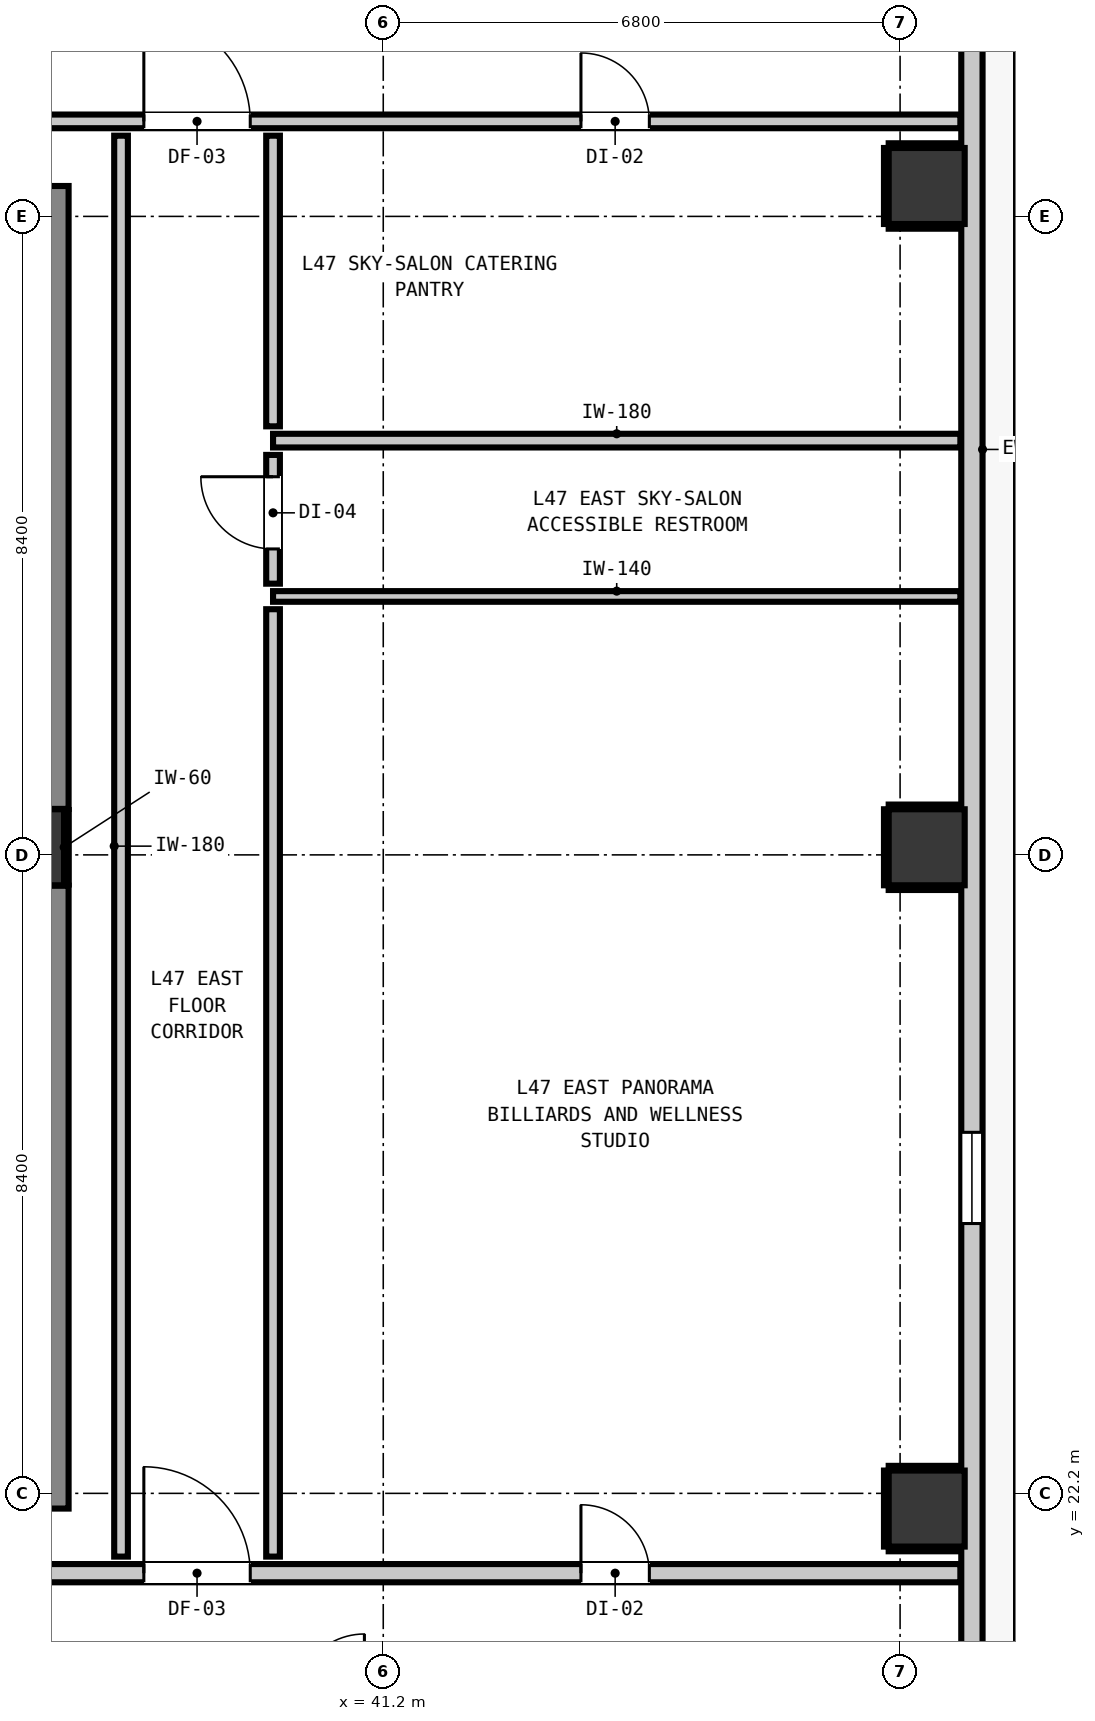
"""IFC4 building model, lengths in metres.
Left out: names, types, materials, properties, quantities, classifications, styles, units other than length and angle.
Written with IfcOpenShell. Run it as: python <this file> out.ifc"""

import sys

from ifc_helpers import new_model, si_unit, direction, frame, frame_2d, origin, origin_2d, place, context, subcontext, project, spatial, rectangle, extrude, element, fill, save


model = new_model("IFC4")
c1 = context("Model", 3, precision=1e-05, world=origin(), true_north=direction((0.0, 1.0)))
c2 = subcontext(c1, "Body", "Model", "MODEL_VIEW")
j1 = project(units=[si_unit("LENGTHUNIT", "METRE"), si_unit("PLANEANGLEUNIT", "RADIAN")], contexts=[c1])
p1 = place(None, origin())
s1 = spatial("IfcSite", under=j1, at=p1, CompositionType="ELEMENT")
p2 = place(p1, origin())
s2 = spatial("IfcBuilding", under=s1, at=p2, CompositionType="ELEMENT")
p3 = place(p2, frame((0.0, 0.0, 162.52)))
s3 = spatial("IfcBuildingStorey", under=s2, at=p3, CompositionType="ELEMENT", Elevation=162.52)
p4 = place(p3, frame((36.5, 30.7, 0.0), z_axis=(0.0, 0.0, 1.0), x_axis=(1.0, 0.0, 0.0)))
e1 = element("IfcColumn", 1, at=p4, inside=s3, PredefinedType="COLUMN", context=c2, shape_type="SweptSolid", body=[
    extrude(rectangle(XDim=1.0, YDim=1.0, at=origin_2d()), origin(), (0.0, 0.0, 1.0), 3.32),
])
p5 = place(p3, frame((36.56, 22.0, 0.0), z_axis=(0.0, 0.0, 1.0), x_axis=(0.0, 1.0, 0.0)))
e2 = element("IfcWall", 2, at=p5, inside=s3, PredefinedType="SHEAR", context=c2, shape_type="SweptSolid", body=[
    extrude(rectangle(XDim=8.195, YDim=1.0, at=frame_2d((4.098, 0.0))), origin(), (0.0, 0.0, 1.0), 3.32),
])
p6 = place(p3, frame((36.56, 31.205, 0.0), z_axis=(0.0, 0.0, 1.0), x_axis=(0.0, 1.0, 0.0)))
e3 = element("IfcWall", 3, at=p6, inside=s3, PredefinedType="SHEAR", context=c2, shape_type="SweptSolid", body=[
    extrude(rectangle(XDim=8.195, YDim=1.0, at=frame_2d((4.097, 0.0))), origin(), (0.0, 0.0, 1.0), 3.32),
])
for number, where, z_axis, x_axis in (
    (4, (48.35, 22.0, 0.0), (0.0, 0.0, 1.0), (1.0, 0.0, 0.0)),
    (5, (48.35, 30.7, 0.0), (0.0, 0.0, 1.0), (1.0, 0.0, 0.0)),
    (6, (48.35, 39.4, 0.0), (0.0, 0.0, 1.0), (1.0, 0.0, 0.0)),
):
    element("IfcColumn", number, at=place(p3, frame(where, z_axis=z_axis, x_axis=x_axis)), inside=s3, PredefinedType="COLUMN", context=c2, shape_type="SweptSolid", body=[
        extrude(rectangle(XDim=1.0, YDim=1.0, at=origin_2d()), origin(), (0.0, 0.0, 1.0), 2.9),
    ])
p7 = place(p3, frame((48.945, 49.845, 0.0), z_axis=(0.0, 0.0, 1.0), x_axis=(0.0, -1.0, 0.0)))
e7 = element("IfcWall", 7, at=p7, inside=s3, PredefinedType="STANDARD", context=c2, shape_type="SweptSolid", body=[
    extrude(rectangle(XDim=32.29, YDim=0.28, at=frame_2d((16.145, 0.0))), origin(), (0.0, 0.0, 1.0), 2.9),
])
p8 = place(p7, frame((2.659, 0.0, 0.0)))
e8 = element("IfcOpeningElement", 8, at=p8, cuts=e7, PredefinedType="OPENING", context=c2, shape_type="SweptSolid", body=[
    extrude(rectangle(XDim=1.0, YDim=2.15, at=frame_2d((0.5, 1.075))), frame((0.0, 0.15, 0.0), z_axis=(0.0, -1.0, 0.0), x_axis=(1.0, 0.0, 0.0)), (0.0, 0.0, 1.0), 0.3),
])
p9 = place(p7, frame((30.747, 0.0, 0.85)))
e9 = element("IfcOpeningElement", 9, at=p9, cuts=e7, PredefinedType="OPENING", context=c2, shape_type="SweptSolid", body=[
    extrude(rectangle(XDim=1.2, YDim=1.8, at=frame_2d((0.6, 0.9))), frame((0.0, 0.15, 0.0), z_axis=(0.0, -1.0, 0.0), x_axis=(1.0, 0.0, 0.0)), (0.0, 0.0, 1.0), 0.3),
])
p10 = place(p7, frame((4.027, 0.0, 0.85)))
e10 = element("IfcOpeningElement", 10, at=p10, cuts=e7, PredefinedType="OPENING", context=c2, shape_type="SweptSolid", body=[
    extrude(rectangle(XDim=0.9, YDim=1.5, at=frame_2d((0.45, 0.75))), frame((0.0, 0.15, 0.0), z_axis=(0.0, -1.0, 0.0), x_axis=(1.0, 0.0, 0.0)), (0.0, 0.0, 1.0), 0.3),
])
p11 = place(p7, frame((0.412, 0.0, 0.85)))
e11 = element("IfcOpeningElement", 11, at=p11, cuts=e7, PredefinedType="OPENING", context=c2, shape_type="SweptSolid", body=[
    extrude(rectangle(XDim=1.2, YDim=1.8, at=frame_2d((0.6, 0.9))), frame((0.0, 0.15, 0.0), z_axis=(0.0, -1.0, 0.0), x_axis=(1.0, 0.0, 0.0)), (0.0, 0.0, 1.0), 0.3),
])
p12 = place(p7, frame((22.895, 0.0, 0.85)))
e12 = element("IfcOpeningElement", 12, at=p12, cuts=e7, PredefinedType="OPENING", context=c2, shape_type="SweptSolid", body=[
    extrude(rectangle(XDim=1.2, YDim=1.8, at=frame_2d((0.6, 0.9))), frame((0.0, 0.15, 0.0), z_axis=(0.0, -1.0, 0.0), x_axis=(1.0, 0.0, 0.0)), (0.0, 0.0, 1.0), 0.3),
])
p13 = place(p3, frame((9.407, 21.15, 0.0), z_axis=(0.0, 0.0, 1.0), x_axis=(1.0, 0.0, 0.0)))
e13 = element("IfcWall", 13, at=p13, inside=s3, PredefinedType="PARTITIONING", context=c2, shape_type="SweptSolid", body=[
    extrude(rectangle(XDim=39.386, YDim=0.24, at=frame_2d((19.693, 0.0))), origin(), (0.0, 0.0, 1.0), 2.9),
])
p14 = place(p13, frame((8.803, 0.0, 0.0)))
e14 = element("IfcOpeningElement", 14, at=p14, cuts=e13, PredefinedType="OPENING", context=c2, shape_type="SweptSolid", body=[
    extrude(rectangle(XDim=1.1, YDim=2.15, at=frame_2d((0.55, 1.075))), frame((0.0, 0.13, 0.0), z_axis=(0.0, -1.0, 0.0), x_axis=(1.0, 0.0, 0.0)), (0.0, 0.0, 1.0), 0.26),
])
p15 = place(p13, frame((1.192, 0.0, 0.0)))
e15 = element("IfcOpeningElement", 15, at=p15, cuts=e13, PredefinedType="OPENING", context=c2, shape_type="SweptSolid", body=[
    extrude(rectangle(XDim=1.4, YDim=2.15, at=frame_2d((0.7, 1.075))), frame((0.0, 0.13, 0.0), z_axis=(0.0, -1.0, 0.0), x_axis=(1.0, 0.0, 0.0)), (0.0, 0.0, 1.0), 0.26),
])
p16 = place(p13, frame((28.643, 0.0, 0.0)))
e16 = element("IfcOpeningElement", 16, at=p16, cuts=e13, PredefinedType="OPENING", context=c2, shape_type="SweptSolid", body=[
    extrude(rectangle(XDim=1.4, YDim=2.15, at=frame_2d((0.7, 1.075))), frame((0.0, 0.13, 0.0), z_axis=(0.0, -1.0, 0.0), x_axis=(1.0, 0.0, 0.0)), (0.0, 0.0, 1.0), 0.26),
])
p17 = place(p13, frame((34.394, 0.0, 0.0)))
e17 = element("IfcOpeningElement", 17, at=p17, cuts=e13, PredefinedType="OPENING", context=c2, shape_type="SweptSolid", body=[
    extrude(rectangle(XDim=0.9, YDim=2.1, at=frame_2d((0.45, 1.05))), frame((0.0, 0.13, 0.0), z_axis=(0.0, -1.0, 0.0), x_axis=(1.0, 0.0, 0.0)), (0.0, 0.0, 1.0), 0.26),
])
p18 = place(p3, frame((39.75, 36.05, 0.0), z_axis=(0.0, 0.0, 1.0), x_axis=(1.0, 0.0, 0.0)))
e18 = element("IfcWall", 18, at=p18, inside=s3, PredefinedType="PARTITIONING", context=c2, shape_type="SweptSolid", body=[
    extrude(rectangle(XDim=9.043, YDim=0.18, at=frame_2d((4.521, 0.0))), origin(), (0.0, 0.0, 1.0), 2.9),
])
p19 = place(p3, frame((9.407, 40.25, 0.0), z_axis=(0.0, 0.0, 1.0), x_axis=(1.0, 0.0, 0.0)))
e19 = element("IfcWall", 19, at=p19, inside=s3, PredefinedType="PARTITIONING", context=c2, shape_type="SweptSolid", body=[
    extrude(rectangle(XDim=39.386, YDim=0.18, at=frame_2d((19.693, 0.0))), origin(), (0.0, 0.0, 1.0), 2.9),
])
p20 = place(p19, frame((8.028, 0.0, 0.0)))
e20 = element("IfcOpeningElement", 20, at=p20, cuts=e19, PredefinedType="OPENING", context=c2, shape_type="SweptSolid", body=[
    extrude(rectangle(XDim=1.4, YDim=2.15, at=frame_2d((0.7, 1.075))), frame((0.0, 0.1, 0.0), z_axis=(0.0, -1.0, 0.0), x_axis=(1.0, 0.0, 0.0)), (0.0, 0.0, 1.0), 0.2),
])
p21 = place(p19, frame((1.192, 0.0, 0.0)))
e21 = element("IfcOpeningElement", 21, at=p21, cuts=e19, PredefinedType="OPENING", context=c2, shape_type="SweptSolid", body=[
    extrude(rectangle(XDim=1.4, YDim=2.15, at=frame_2d((0.7, 1.075))), frame((0.0, 0.1, 0.0), z_axis=(0.0, -1.0, 0.0), x_axis=(1.0, 0.0, 0.0)), (0.0, 0.0, 1.0), 0.2),
])
p22 = place(p19, frame((28.643, 0.0, 0.0)))
e22 = element("IfcOpeningElement", 22, at=p22, cuts=e19, PredefinedType="OPENING", context=c2, shape_type="SweptSolid", body=[
    extrude(rectangle(XDim=1.4, YDim=2.15, at=frame_2d((0.7, 1.075))), frame((0.0, 0.1, 0.0), z_axis=(0.0, -1.0, 0.0), x_axis=(1.0, 0.0, 0.0)), (0.0, 0.0, 1.0), 0.2),
])
p23 = place(p19, frame((34.394, 0.0, 0.0)))
e23 = element("IfcOpeningElement", 23, at=p23, cuts=e19, PredefinedType="OPENING", context=c2, shape_type="SweptSolid", body=[
    extrude(rectangle(XDim=0.9, YDim=2.1, at=frame_2d((0.45, 1.05))), frame((0.0, 0.1, 0.0), z_axis=(0.0, -1.0, 0.0), x_axis=(1.0, 0.0, 0.0)), (0.0, 0.0, 1.0), 0.2),
])
p24 = place(p3, frame((39.75, 34.0, 0.0), z_axis=(0.0, 0.0, 1.0), x_axis=(1.0, 0.0, 0.0)))
e24 = element("IfcWall", 24, at=p24, inside=s3, PredefinedType="PARTITIONING", context=c2, shape_type="SweptSolid", body=[
    extrude(rectangle(XDim=9.043, YDim=0.14, at=frame_2d((4.521, 0.0))), origin(), (0.0, 0.0, 1.0), 2.9),
])
p25 = place(p3, frame((37.75, 21.368, 0.0), z_axis=(0.0, 0.0, 1.0), x_axis=(0.0, 1.0, 0.0)))
e25 = element("IfcWall", 25, at=p25, inside=s3, PredefinedType="PARTITIONING", context=c2, shape_type="SweptSolid", body=[
    extrude(rectangle(XDim=18.694, YDim=0.18, at=frame_2d((9.347, 0.0))), origin(), (0.0, 0.0, 1.0), 2.9),
])
p26 = place(p3, frame((39.75, 21.368, 0.0), z_axis=(0.0, 0.0, 1.0), x_axis=(0.0, 1.0, 0.0)))
e26 = element("IfcWall", 26, at=p26, inside=s3, PredefinedType="PARTITIONING", context=c2, shape_type="SweptSolid", body=[
    extrude(rectangle(XDim=12.464, YDim=0.18, at=frame_2d((6.232, 0.0))), origin(), (0.0, 0.0, 1.0), 2.9),
])
p27 = place(p3, frame((39.75, 34.168, 0.0), z_axis=(0.0, 0.0, 1.0), x_axis=(0.0, 1.0, 0.0)))
e27 = element("IfcWall", 27, at=p27, inside=s3, PredefinedType="PARTITIONING", context=c2, shape_type="SweptSolid", body=[
    extrude(rectangle(XDim=1.694, YDim=0.18, at=frame_2d((0.847, 0.0))), origin(), (0.0, 0.0, 1.0), 2.9),
])
p28 = place(p27, frame((0.457, 0.0, 0.0)))
e28 = element("IfcOpeningElement", 28, at=p28, cuts=e27, PredefinedType="OPENING", context=c2, shape_type="SweptSolid", body=[
    extrude(rectangle(XDim=0.95, YDim=2.1, at=frame_2d((0.475, 1.05))), frame((0.0, 0.1, 0.0), z_axis=(0.0, -1.0, 0.0), x_axis=(1.0, 0.0, 0.0)), (0.0, 0.0, 1.0), 0.2),
])
p29 = place(p3, frame((39.75, 36.238, 0.0), z_axis=(0.0, 0.0, 1.0), x_axis=(0.0, 1.0, 0.0)))
e29 = element("IfcWall", 29, at=p29, inside=s3, PredefinedType="PARTITIONING", context=c2, shape_type="SweptSolid", body=[
    extrude(rectangle(XDim=3.824, YDim=0.18, at=frame_2d((1.912, 0.0))), origin(), (0.0, 0.0, 1.0), 2.9),
])
p30 = place(p3, frame((37.032, 30.21, 0.0), z_axis=(0.0, 0.0, 1.0), x_axis=(0.0, 1.0, 0.0)))
e30 = element("IfcWall", 30, at=p30, inside=s3, PredefinedType="PARTITIONING", context=c2, shape_type="SweptSolid", body=[
    extrude(rectangle(XDim=0.98, YDim=0.06, at=frame_2d((0.49, 0.0))), origin(), (0.0, 0.0, 1.0), 0.905),
])
for number, where, z_axis, x_axis in (
    (31, (47.85, 21.468, 0.0), (0.0, 0.0, 1.0), (1.0, 0.0, 0.0)),
    (32, (47.85, 22.532, 0.0), (0.0, 0.0, 1.0), (1.0, 0.0, 0.0)),
):
    element("IfcWall", number, at=place(p3, frame(where, z_axis=z_axis, x_axis=x_axis)), inside=s3, PredefinedType="PARTITIONING", context=c2, shape_type="SweptSolid", body=[
        extrude(rectangle(XDim=0.94, YDim=0.06, at=frame_2d((0.47, 0.0))), origin(), (0.0, 0.0, 1.0), 0.905),
    ])
p31 = place(p3, frame((47.818, 21.5, 0.0), z_axis=(0.0, 0.0, 1.0), x_axis=(0.0, 1.0, 0.0)))
e33 = element("IfcWall", 33, at=p31, inside=s3, PredefinedType="PARTITIONING", context=c2, shape_type="SweptSolid", body=[
    extrude(rectangle(XDim=1.0, YDim=0.06, at=frame_2d((0.5, 0.0))), origin(), (0.0, 0.0, 1.0), 1.45),
])
for number, where, z_axis, x_axis in (
    (34, (47.85, 30.168, 0.0), (0.0, 0.0, 1.0), (1.0, 0.0, 0.0)),
    (35, (47.85, 31.232, 0.0), (0.0, 0.0, 1.0), (1.0, 0.0, 0.0)),
):
    element("IfcWall", number, at=place(p3, frame(where, z_axis=z_axis, x_axis=x_axis)), inside=s3, PredefinedType="PARTITIONING", context=c2, shape_type="SweptSolid", body=[
        extrude(rectangle(XDim=0.94, YDim=0.06, at=frame_2d((0.47, 0.0))), origin(), (0.0, 0.0, 1.0), 0.905),
    ])
p32 = place(p3, frame((47.818, 30.2, 0.0), z_axis=(0.0, 0.0, 1.0), x_axis=(0.0, 1.0, 0.0)))
e36 = element("IfcWall", 36, at=p32, inside=s3, PredefinedType="PARTITIONING", context=c2, shape_type="SweptSolid", body=[
    extrude(rectangle(XDim=1.0, YDim=0.06, at=frame_2d((0.5, 0.0))), origin(), (0.0, 0.0, 1.0), 1.45),
])
for number, where, z_axis, x_axis in (
    (37, (47.85, 38.868, 0.0), (0.0, 0.0, 1.0), (1.0, 0.0, 0.0)),
    (38, (47.85, 39.932, 0.0), (0.0, 0.0, 1.0), (1.0, 0.0, 0.0)),
):
    element("IfcWall", number, at=place(p3, frame(where, z_axis=z_axis, x_axis=x_axis)), inside=s3, PredefinedType="PARTITIONING", context=c2, shape_type="SweptSolid", body=[
        extrude(rectangle(XDim=0.94, YDim=0.06, at=frame_2d((0.47, 0.0))), origin(), (0.0, 0.0, 1.0), 0.905),
    ])
p33 = place(p3, frame((47.818, 38.9, 0.0), z_axis=(0.0, 0.0, 1.0), x_axis=(0.0, 1.0, 0.0)))
e39 = element("IfcWall", 39, at=p33, inside=s3, PredefinedType="PARTITIONING", context=c2, shape_type="SweptSolid", body=[
    extrude(rectangle(XDim=1.0, YDim=0.06, at=frame_2d((0.5, 0.0))), origin(), (0.0, 0.0, 1.0), 1.45),
])
p34 = place(p12, origin())
e40 = element("IfcWindow", 40, at=p34, inside=s3, PartitioningType="SINGLE_PANEL", PredefinedType="WINDOW", context=c2, shape_type="SweptSolid", body=[
    extrude(rectangle(XDim=1.2, YDim=1.8, at=frame_2d((0.6, 0.9))), frame((0.0, 0.03, 0.0), z_axis=(0.0, -1.0, 0.0), x_axis=(1.0, 0.0, 0.0)), (0.0, 0.0, 1.0), 0.06),
])
fill(e12, e40)
p35 = place(p16, origin())
e41 = element("IfcDoor", 41, at=p35, inside=s3, OperationType="SINGLE_SWING_LEFT", PredefinedType="DOOR", context=c2, shape_type="SweptSolid", body=[
    extrude(rectangle(XDim=1.4, YDim=2.15, at=frame_2d((0.7, 1.075))), frame((0.0, 0.025, 0.0), z_axis=(0.0, -1.0, 0.0), x_axis=(1.0, 0.0, 0.0)), (0.0, 0.0, 1.0), 0.05),
])
fill(e16, e41)
p36 = place(p22, origin())
e42 = element("IfcDoor", 42, at=p36, inside=s3, OperationType="SINGLE_SWING_LEFT", PredefinedType="DOOR", context=c2, shape_type="SweptSolid", body=[
    extrude(rectangle(XDim=1.4, YDim=2.15, at=frame_2d((0.7, 1.075))), frame((0.0, 0.025, 0.0), z_axis=(0.0, -1.0, 0.0), x_axis=(1.0, 0.0, 0.0)), (0.0, 0.0, 1.0), 0.05),
])
fill(e22, e42)
p37 = place(p17, origin())
e43 = element("IfcDoor", 43, at=p37, inside=s3, OperationType="SINGLE_SWING_LEFT", PredefinedType="DOOR", context=c2, shape_type="SweptSolid", body=[
    extrude(rectangle(XDim=0.9, YDim=2.1, at=frame_2d((0.45, 1.05))), frame((0.0, 0.025, 0.0), z_axis=(0.0, -1.0, 0.0), x_axis=(1.0, 0.0, 0.0)), (0.0, 0.0, 1.0), 0.05),
])
fill(e17, e43)
p38 = place(p28, origin())
e44 = element("IfcDoor", 44, at=p38, inside=s3, OperationType="SINGLE_SWING_RIGHT", PredefinedType="DOOR", context=c2, shape_type="SweptSolid", body=[
    extrude(rectangle(XDim=0.95, YDim=2.1, at=frame_2d((0.475, 1.05))), frame((0.0, 0.025, 0.0), z_axis=(0.0, -1.0, 0.0), x_axis=(1.0, 0.0, 0.0)), (0.0, 0.0, 1.0), 0.05),
])
fill(e28, e44)
p39 = place(p23, origin())
e45 = element("IfcDoor", 45, at=p39, inside=s3, OperationType="SINGLE_SWING_LEFT", PredefinedType="DOOR", context=c2, shape_type="SweptSolid", body=[
    extrude(rectangle(XDim=0.9, YDim=2.1, at=frame_2d((0.45, 1.05))), frame((0.0, 0.025, 0.0), z_axis=(0.0, -1.0, 0.0), x_axis=(1.0, 0.0, 0.0)), (0.0, 0.0, 1.0), 0.05),
])
fill(e23, e45)
save(model, sys.argv[1])
